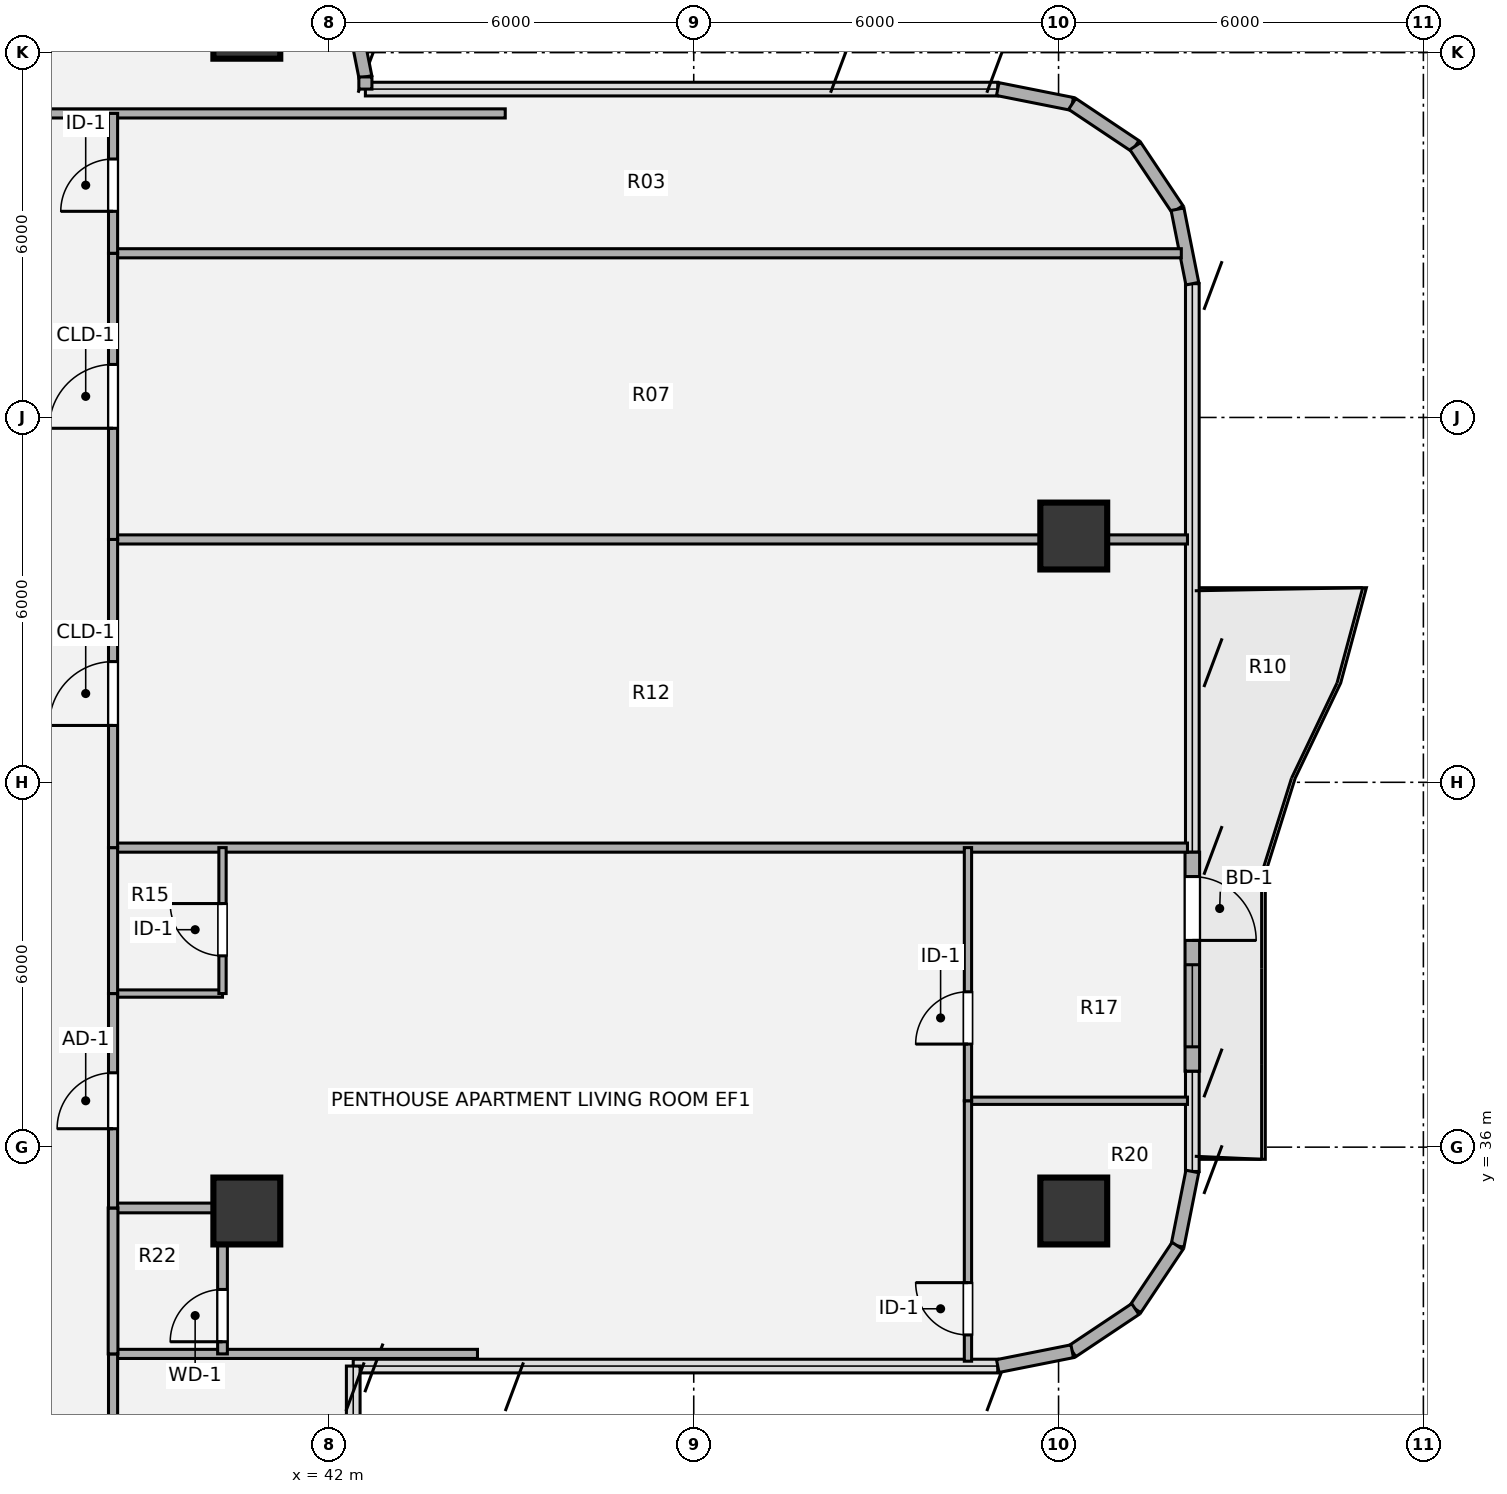
"""IFC4 building model, lengths in metres.
Left out: names, types, materials, properties, quantities, classifications, styles, units other than length and angle.
Written with IfcOpenShell. Run it as: python <this file> out.ifc"""

import sys

from ifc_helpers import new_model, si_unit, direction, frame, frame_2d, origin, origin_2d, place, context, subcontext, project, spatial, rectangle, hollow_circle, extrude, source, transform, mapped, element, fill, save


model = new_model("IFC4")
c1 = context("Model", 3, precision=1e-05, world=origin(), true_north=direction((0.0, 1.0)))
c2 = subcontext(c1, "Body", "Model", "MODEL_VIEW")
j1 = project(units=[si_unit("LENGTHUNIT", "METRE"), si_unit("PLANEANGLEUNIT", "RADIAN")], contexts=[c1])
p1 = place(None, origin())
s1 = spatial("IfcSite", under=j1, at=p1, CompositionType="ELEMENT")
p2 = place(p1, origin())
s2 = spatial("IfcBuilding", under=s1, at=p2, CompositionType="ELEMENT")
p3 = place(p2, frame((0.0, 0.0, 209.34)))
s3 = spatial("IfcBuildingStorey", under=s2, at=p3, CompositionType="ELEMENT", Elevation=209.34)
m1 = source(origin(), c2, "Body", "SweptSolid", [
    extrude(hollow_circle(Radius=0.55, WallThickness=0.04, at=origin_2d()), origin(), (0.0, 0.0, 1.0), 3.372),
])
for number, where, z_axis, x_axis in (
    (1, (54.25, 34.95, 0.0), (0.0, 0.0, 1.0), (1.0, 0.0, 0.0)),
    (2, (54.25, 46.05, 0.0), (0.0, 0.0, 1.0), (1.0, 0.0, 0.0)),
    (3, (40.65, 34.95, 0.0), (0.0, 0.0, 1.0), (1.0, 0.0, 0.0)),
    (4, (40.65, 54.45, 0.0), (0.0, 0.0, 1.0), (1.0, 0.0, 0.0)),
):
    element("IfcColumn", number, at=place(p3, frame(where, z_axis=z_axis, x_axis=x_axis)), inside=s3, PredefinedType="COLUMN", context=c2, shape_type="MappedRepresentation", body=[
        mapped(m1, transform((0.0, 0.0, 0.0), x_axis=(1.0, 0.0, 0.0), y_axis=(0.0, 1.0, 0.0), z_axis=(0.0, 0.0, 1.0), scale=1.0)),
    ])
p4 = place(p3, frame((42.387, 54.671, 0.0), z_axis=(0.0, 0.0, 1.0), x_axis=(0.195127417394, -0.980777900945, 0.0)))
e5 = element("IfcWall", 5, at=p4, inside=s3, PredefinedType="SOLIDWALL", context=c2, shape_type="SweptSolid", body=[
    extrude(rectangle(XDim=1.092, YDim=0.215, at=frame_2d((0.546, 0.0))), origin(), (0.0, 0.0, 1.0), 3.372),
])
p5 = place(p3, frame((42.6, 53.6, 0.0), z_axis=(0.0, 0.0, 1.0), x_axis=(0.0, -1.0, 0.0)))
e6 = element("IfcWall", 6, at=p5, inside=s3, PredefinedType="SOLIDWALL", context=c2, shape_type="SweptSolid", body=[
    extrude(rectangle(XDim=0.2, YDim=0.215, at=frame_2d((0.1, 0.0))), origin(), (0.0, 0.0, 1.0), 3.372),
])
for number, where, z_axis, x_axis in (
    (7, (53.0, 53.4, 0.0), (0.0, 0.0, 1.0), (0.981, -0.195, 0.0)),
    (8, (54.225, 53.156, 0.0), (0.0, 0.0, 1.0), (0.831, -0.556, 0.0)),
    (9, (55.263, 52.463, 0.0), (0.0, 0.0, 1.0), (0.556, -0.831, 0.0)),
    (10, (55.956, 51.425, 0.0), (0.0, 0.0, 1.0), (0.195, -0.981, 0.0)),
):
    element("IfcWall", number, at=place(p3, frame(where, z_axis=z_axis, x_axis=x_axis)), inside=s3, PredefinedType="SOLIDWALL", context=c2, shape_type="SweptSolid", body=[
        extrude(rectangle(XDim=1.249, YDim=0.215, at=frame_2d((0.624, 0.0))), origin(), (0.0, 0.0, 1.0), 3.372),
    ])
p6 = place(p3, frame((56.2, 40.85, 0.0), z_axis=(0.0, 0.0, 1.0), x_axis=(0.0, -1.0, 0.0)))
e11 = element("IfcWall", 11, at=p6, inside=s3, PredefinedType="SOLIDWALL", context=c2, shape_type="SweptSolid", body=[
    extrude(rectangle(XDim=3.6, YDim=0.24, at=frame_2d((1.8, 0.0))), origin(), (0.0, 0.0, 1.0), 3.372),
])
p7 = place(p6, frame((0.4, 0.0, 0.0)))
e12 = element("IfcOpeningElement", 12, at=p7, cuts=e11, PredefinedType="OPENING", context=c2, shape_type="SweptSolid", body=[
    extrude(rectangle(XDim=1.05, YDim=2.15, at=origin_2d()), frame((0.525, 0.13, 1.075), z_axis=(0.0, -1.0, 0.0), x_axis=(1.0, 0.0, 0.0)), (0.0, 0.0, 1.0), 0.26),
])
p8 = place(p6, frame((1.85, 0.0, 0.85)))
e13 = element("IfcOpeningElement", 13, at=p8, cuts=e11, PredefinedType="OPENING", context=c2, shape_type="SweptSolid", body=[
    extrude(rectangle(XDim=1.35, YDim=1.35, at=origin_2d()), frame((0.675, 0.13, 0.675), z_axis=(0.0, -1.0, 0.0), x_axis=(1.0, 0.0, 0.0)), (0.0, 0.0, 1.0), 0.26),
])
for number, where, z_axis, x_axis in (
    (14, (56.2, 35.6, 0.0), (0.0, 0.0, 1.0), (-0.195, -0.981, 0.0)),
    (15, (55.956, 34.375, 0.0), (0.0, 0.0, 1.0), (-0.556, -0.831, 0.0)),
    (16, (55.263, 33.337, 0.0), (0.0, 0.0, 1.0), (-0.831, -0.556, 0.0)),
    (17, (54.225, 32.644, 0.0), (0.0, 0.0, 1.0), (-0.981, -0.195, 0.0)),
):
    element("IfcWall", number, at=place(p3, frame(where, z_axis=z_axis, x_axis=x_axis)), inside=s3, PredefinedType="SOLIDWALL", context=c2, shape_type="SweptSolid", body=[
        extrude(rectangle(XDim=1.249, YDim=0.215, at=frame_2d((0.624, 0.0))), origin(), (0.0, 0.0, 1.0), 3.372),
    ])
p9 = place(p3, frame((38.45, 32.6, 0.0), z_axis=(0.0, 0.0, 1.0), x_axis=(1.0, 0.0, 0.0)))
e18 = element("IfcWall", 18, at=p9, inside=s3, PredefinedType="PARTITIONING", context=c2, shape_type="SweptSolid", body=[
    extrude(rectangle(XDim=5.993, YDim=0.15, at=frame_2d((2.997, 0.0))), origin(), (0.0, 0.0, 1.0), 3.342),
])
p10 = place(p3, frame((38.45, 35.0, 0.0), z_axis=(0.0, 0.0, 1.0), x_axis=(1.0, 0.0, 0.0)))
e19 = element("IfcWall", 19, at=p10, inside=s3, PredefinedType="PLUMBINGWALL", context=c2, shape_type="SweptSolid", body=[
    extrude(rectangle(XDim=1.8, YDim=0.16, at=frame_2d((0.9, 0.0))), origin(), (0.0, 0.0, 1.0), 1.857),
])
p11 = place(p3, frame((52.51, 36.763, 0.0), z_axis=(0.0, 0.0, 1.0), x_axis=(1.0, 0.0, 0.0)))
e20 = element("IfcWall", 20, at=p11, inside=s3, PredefinedType="PARTITIONING", context=c2, shape_type="SweptSolid", body=[
    extrude(rectangle(XDim=3.61, YDim=0.12, at=frame_2d((1.805, 0.0))), origin(), (0.0, 0.0, 1.0), 2.824),
])
p12 = place(p3, frame((38.45, 38.526, 0.0), z_axis=(0.0, 0.0, 1.0), x_axis=(1.0, 0.0, 0.0)))
e21 = element("IfcWall", 21, at=p12, inside=s3, PredefinedType="PARTITIONING", context=c2, shape_type="SweptSolid", body=[
    extrude(rectangle(XDim=1.8, YDim=0.12, at=frame_2d((0.9, 0.0))), origin(), (0.0, 0.0, 1.0), 3.101),
])
p13 = place(p3, frame((38.45, 40.926, 0.0), z_axis=(0.0, 0.0, 1.0), x_axis=(1.0, 0.0, 0.0)))
e22 = element("IfcWall", 22, at=p13, inside=s3, PredefinedType="PARTITIONING", context=c2, shape_type="SweptSolid", body=[
    extrude(rectangle(XDim=17.67, YDim=0.15, at=frame_2d((8.835, 0.0))), origin(), (0.0, 0.0, 1.0), 2.824),
])
p14 = place(p3, frame((38.45, 45.994, 0.0), z_axis=(0.0, 0.0, 1.0), x_axis=(1.0, 0.0, 0.0)))
e23 = element("IfcWall", 23, at=p14, inside=s3, PredefinedType="PARTITIONING", context=c2, shape_type="SweptSolid", body=[
    extrude(rectangle(XDim=17.67, YDim=0.15, at=frame_2d((8.835, 0.0))), origin(), (0.0, 0.0, 1.0), 2.457),
])
p15 = place(p3, frame((38.45, 50.7, 0.0), z_axis=(0.0, 0.0, 1.0), x_axis=(1.0, 0.0, 0.0)))
e24 = element("IfcWall", 24, at=p15, inside=s3, PredefinedType="PARTITIONING", context=c2, shape_type="SweptSolid", body=[
    extrude(rectangle(XDim=17.569, YDim=0.15, at=frame_2d((8.785, 0.0))), origin(), (0.0, 0.0, 1.0), 3.15),
])
p16 = place(p3, frame((27.1, 53.0, 0.0), z_axis=(0.0, 0.0, 1.0), x_axis=(1.0, 0.0, 0.0)))
e25 = element("IfcWall", 25, at=p16, inside=s3, PredefinedType="PARTITIONING", context=c2, shape_type="SweptSolid", body=[
    extrude(rectangle(XDim=17.8, YDim=0.15, at=frame_2d((8.9, 0.0))), origin(), (0.0, 0.0, 1.0), 3.15),
])
p17 = place(p16, frame((8.375, 0.0, 0.0)))
e26 = element("IfcOpeningElement", 26, at=p17, cuts=e25, PredefinedType="OPENING", context=c2, shape_type="SweptSolid", body=[
    extrude(rectangle(XDim=1.05, YDim=2.1, at=origin_2d()), frame((0.525, 0.085, 1.05), z_axis=(0.0, -1.0, 0.0), x_axis=(1.0, 0.0, 0.0)), (0.0, 0.0, 1.0), 0.17),
])
p18 = place(p3, frame((38.45, 21.2, 0.0), z_axis=(0.0, 0.0, 1.0), x_axis=(0.0, 1.0, 0.0)))
e27 = element("IfcWall", 27, at=p18, inside=s3, PredefinedType="PARTITIONING", context=c2, shape_type="SweptSolid", body=[
    extrude(rectangle(XDim=11.4, YDim=0.15, at=frame_2d((5.7, 0.0))), origin(), (0.0, 0.0, 1.0), 3.342),
])
p19 = place(p18, frame((5.075, 0.0, 0.0)))
e28 = element("IfcOpeningElement", 28, at=p19, cuts=e27, PredefinedType="OPENING", context=c2, shape_type="SweptSolid", body=[
    extrude(rectangle(XDim=1.05, YDim=2.1, at=origin_2d()), frame((0.525, 0.085, 1.05), z_axis=(0.0, -1.0, 0.0), x_axis=(1.0, 0.0, 0.0)), (0.0, 0.0, 1.0), 0.17),
])
p20 = place(p3, frame((38.45, 32.6, 0.0), z_axis=(0.0, 0.0, 1.0), x_axis=(0.0, 1.0, 0.0)))
e29 = element("IfcWall", 29, at=p20, inside=s3, PredefinedType="PLUMBINGWALL", context=c2, shape_type="SweptSolid", body=[
    extrude(rectangle(XDim=2.4, YDim=0.16, at=frame_2d((1.2, 0.0))), origin(), (0.0, 0.0, 1.0), 3.342),
])
p21 = place(p3, frame((38.45, 35.0, 0.0), z_axis=(0.0, 0.0, 1.0), x_axis=(0.0, 1.0, 0.0)))
e30 = element("IfcWall", 30, at=p21, inside=s3, PredefinedType="PARTITIONING", context=c2, shape_type="SweptSolid", body=[
    extrude(rectangle(XDim=3.526, YDim=0.15, at=frame_2d((1.763, 0.0))), origin(), (0.0, 0.0, 1.0), 3.342),
])
p22 = place(p21, frame((1.303, 0.0, 0.0)))
e31 = element("IfcOpeningElement", 31, at=p22, cuts=e30, PredefinedType="OPENING", context=c2, shape_type="SweptSolid", body=[
    extrude(rectangle(XDim=0.92, YDim=2.1, at=origin_2d()), frame((0.46, 0.085, 1.05), z_axis=(0.0, -1.0, 0.0), x_axis=(1.0, 0.0, 0.0)), (0.0, 0.0, 1.0), 0.17),
])
p23 = place(p3, frame((38.45, 38.526, 0.0), z_axis=(0.0, 0.0, 1.0), x_axis=(0.0, 1.0, 0.0)))
e32 = element("IfcWall", 32, at=p23, inside=s3, PredefinedType="PARTITIONING", context=c2, shape_type="SweptSolid", body=[
    extrude(rectangle(XDim=2.4, YDim=0.15, at=frame_2d((1.2, 0.0))), origin(), (0.0, 0.0, 1.0), 3.342),
])
p24 = place(p3, frame((38.45, 40.926, 0.0), z_axis=(0.0, 0.0, 1.0), x_axis=(0.0, 1.0, 0.0)))
e33 = element("IfcWall", 33, at=p24, inside=s3, PredefinedType="PARTITIONING", context=c2, shape_type="SweptSolid", body=[
    extrude(rectangle(XDim=5.068, YDim=0.15, at=frame_2d((2.534, 0.0))), origin(), (0.0, 0.0, 1.0), 3.342),
])
p25 = place(p24, frame((2.009, 0.0, 0.0)))
e34 = element("IfcOpeningElement", 34, at=p25, cuts=e33, PredefinedType="OPENING", context=c2, shape_type="SweptSolid", body=[
    extrude(rectangle(XDim=1.05, YDim=2.1, at=origin_2d()), frame((0.525, 0.085, 1.05), z_axis=(0.0, -1.0, 0.0), x_axis=(1.0, 0.0, 0.0)), (0.0, 0.0, 1.0), 0.17),
])
p26 = place(p3, frame((38.45, 45.994, 0.0), z_axis=(0.0, 0.0, 1.0), x_axis=(0.0, 1.0, 0.0)))
e35 = element("IfcWall", 35, at=p26, inside=s3, PredefinedType="PARTITIONING", context=c2, shape_type="SweptSolid", body=[
    extrude(rectangle(XDim=4.706, YDim=0.15, at=frame_2d((2.353, 0.0))), origin(), (0.0, 0.0, 1.0), 3.342),
])
p27 = place(p26, frame((1.828, 0.0, 0.0)))
e36 = element("IfcOpeningElement", 36, at=p27, cuts=e35, PredefinedType="OPENING", context=c2, shape_type="SweptSolid", body=[
    extrude(rectangle(XDim=1.05, YDim=2.1, at=origin_2d()), frame((0.525, 0.085, 1.05), z_axis=(0.0, -1.0, 0.0), x_axis=(1.0, 0.0, 0.0)), (0.0, 0.0, 1.0), 0.17),
])
p28 = place(p3, frame((38.45, 50.7, 0.0), z_axis=(0.0, 0.0, 1.0), x_axis=(0.0, 1.0, 0.0)))
e37 = element("IfcWall", 37, at=p28, inside=s3, PredefinedType="PARTITIONING", context=c2, shape_type="SweptSolid", body=[
    extrude(rectangle(XDim=2.3, YDim=0.15, at=frame_2d((1.15, 0.0))), origin(), (0.0, 0.0, 1.0), 3.342),
])
p29 = place(p28, frame((0.69, 0.0, 0.0)))
e38 = element("IfcOpeningElement", 38, at=p29, cuts=e37, PredefinedType="OPENING", context=c2, shape_type="SweptSolid", body=[
    extrude(rectangle(XDim=0.86, YDim=2.1, at=origin_2d()), frame((0.43, 0.085, 1.05), z_axis=(0.0, -1.0, 0.0), x_axis=(1.0, 0.0, 0.0)), (0.0, 0.0, 1.0), 0.17),
])
p30 = place(p3, frame((40.25, 32.6, 0.0), z_axis=(0.0, 0.0, 1.0), x_axis=(0.0, 1.0, 0.0)))
e39 = element("IfcWall", 39, at=p30, inside=s3, PredefinedType="PLUMBINGWALL", context=c2, shape_type="SweptSolid", body=[
    extrude(rectangle(XDim=2.4, YDim=0.16, at=frame_2d((1.2, 0.0))), origin(), (0.0, 0.0, 1.0), 3.342),
])
p31 = place(p30, frame((0.2, 0.0, 0.0)))
e40 = element("IfcOpeningElement", 40, at=p31, cuts=e39, PredefinedType="OPENING", context=c2, shape_type="SweptSolid", body=[
    extrude(rectangle(XDim=0.86, YDim=2.1, at=origin_2d()), frame((0.43, 0.09, 1.05), z_axis=(0.0, -1.0, 0.0), x_axis=(1.0, 0.0, 0.0)), (0.0, 0.0, 1.0), 0.18),
])
p32 = place(p3, frame((40.25, 38.526, 0.0), z_axis=(0.0, 0.0, 1.0), x_axis=(0.0, 1.0, 0.0)))
e41 = element("IfcWall", 41, at=p32, inside=s3, PredefinedType="PARTITIONING", context=c2, shape_type="SweptSolid", body=[
    extrude(rectangle(XDim=2.4, YDim=0.12, at=frame_2d((1.2, 0.0))), origin(), (0.0, 0.0, 1.0), 3.342),
])
p33 = place(p32, frame((0.62, 0.0, 0.0)))
e42 = element("IfcOpeningElement", 42, at=p33, cuts=e41, PredefinedType="OPENING", context=c2, shape_type="SweptSolid", body=[
    extrude(rectangle(XDim=0.86, YDim=2.1, at=origin_2d()), frame((0.43, 0.07, 1.05), z_axis=(0.0, -1.0, 0.0), x_axis=(1.0, 0.0, 0.0)), (0.0, 0.0, 1.0), 0.14),
])
p34 = place(p3, frame((52.51, 32.48, 0.0), z_axis=(0.0, 0.0, 1.0), x_axis=(0.0, 1.0, 0.0)))
e43 = element("IfcWall", 43, at=p34, inside=s3, PredefinedType="PARTITIONING", context=c2, shape_type="SweptSolid", body=[
    extrude(rectangle(XDim=4.283, YDim=0.12, at=frame_2d((2.142, 0.0))), origin(), (0.0, 0.0, 1.0), 3.342),
])
p35 = place(p34, frame((0.432, 0.0, 0.0)))
e44 = element("IfcOpeningElement", 44, at=p35, cuts=e43, PredefinedType="OPENING", context=c2, shape_type="SweptSolid", body=[
    extrude(rectangle(XDim=0.86, YDim=2.1, at=origin_2d()), frame((0.43, 0.07, 1.05), z_axis=(0.0, -1.0, 0.0), x_axis=(1.0, 0.0, 0.0)), (0.0, 0.0, 1.0), 0.14),
])
p36 = place(p3, frame((52.51, 36.763, 0.0), z_axis=(0.0, 0.0, 1.0), x_axis=(0.0, 1.0, 0.0)))
e45 = element("IfcWall", 45, at=p36, inside=s3, PredefinedType="PARTITIONING", context=c2, shape_type="SweptSolid", body=[
    extrude(rectangle(XDim=4.163, YDim=0.12, at=frame_2d((2.082, 0.0))), origin(), (0.0, 0.0, 1.0), 3.342),
])
p37 = place(p36, frame((0.932, 0.0, 0.0)))
e46 = element("IfcOpeningElement", 46, at=p37, cuts=e45, PredefinedType="OPENING", context=c2, shape_type="SweptSolid", body=[
    extrude(rectangle(XDim=0.86, YDim=2.1, at=origin_2d()), frame((0.43, 0.07, 1.05), z_axis=(0.0, -1.0, 0.0), x_axis=(1.0, 0.0, 0.0)), (0.0, 0.0, 1.0), 0.14),
])
m2 = source(origin(), c2, "Body", "SweptSolid", [
    extrude(rectangle(XDim=1.05, YDim=2.15, at=origin_2d()), frame((0.525, 0.025, 1.075), z_axis=(0.0, -1.0, 0.0), x_axis=(1.0, 0.0, 0.0)), (0.0, 0.0, 1.0), 0.05),
])
p38 = place(p7, origin())
e47 = element("IfcDoor", 47, at=p38, inside=s3, OperationType="SINGLE_SWING_RIGHT", PredefinedType="DOOR", context=c2, shape_type="MappedRepresentation", body=[
    mapped(m2, transform((0.0, 0.0, 0.0), x_axis=(1.0, 0.0, 0.0), y_axis=(0.0, 1.0, 0.0), z_axis=(0.0, 0.0, 1.0), scale=1.0)),
])
fill(e12, e47)
m3 = source(origin(), c2, "Body", "SweptSolid", [
    extrude(rectangle(XDim=1.35, YDim=1.35, at=origin_2d()), frame((0.675, 0.03, 0.675), z_axis=(0.0, -1.0, 0.0), x_axis=(1.0, 0.0, 0.0)), (0.0, 0.0, 1.0), 0.06),
])
p39 = place(p8, origin())
e48 = element("IfcWindow", 48, at=p39, inside=s3, PartitioningType="SINGLE_PANEL", PredefinedType="WINDOW", context=c2, shape_type="MappedRepresentation", body=[
    mapped(m3, transform((0.0, 0.0, 0.0), x_axis=(1.0, 0.0, 0.0), y_axis=(0.0, 1.0, 0.0), z_axis=(0.0, 0.0, 1.0), scale=1.0)),
])
fill(e13, e48)
m4 = source(origin(), c2, "Body", "SweptSolid", [
    extrude(rectangle(XDim=0.92, YDim=2.1, at=origin_2d()), frame((0.46, 0.025, 1.05), z_axis=(0.0, -1.0, 0.0), x_axis=(1.0, 0.0, 0.0)), (0.0, 0.0, 1.0), 0.05),
])
p40 = place(p22, origin())
e49 = element("IfcDoor", 49, at=p40, inside=s3, OperationType="SINGLE_SWING_LEFT", PredefinedType="DOOR", context=c2, shape_type="MappedRepresentation", body=[
    mapped(m4, transform((0.0, 0.0, 0.0), x_axis=(1.0, 0.0, 0.0), y_axis=(0.0, 1.0, 0.0), z_axis=(0.0, 0.0, 1.0), scale=1.0)),
])
fill(e31, e49)
m5 = source(origin(), c2, "Body", "SweptSolid", [
    extrude(rectangle(XDim=1.05, YDim=2.1, at=origin_2d()), frame((0.525, 0.025, 1.05), z_axis=(0.0, -1.0, 0.0), x_axis=(1.0, 0.0, 0.0)), (0.0, 0.0, 1.0), 0.05),
])
p41 = place(p25, origin())
e50 = element("IfcDoor", 50, at=p41, inside=s3, OperationType="SINGLE_SWING_LEFT", PredefinedType="DOOR", context=c2, shape_type="MappedRepresentation", body=[
    mapped(m5, transform((0.0, 0.0, 0.0), x_axis=(1.0, 0.0, 0.0), y_axis=(0.0, 1.0, 0.0), z_axis=(0.0, 0.0, 1.0), scale=1.0)),
])
fill(e34, e50)
p42 = place(p27, origin())
e51 = element("IfcDoor", 51, at=p42, inside=s3, OperationType="SINGLE_SWING_LEFT", PredefinedType="DOOR", context=c2, shape_type="MappedRepresentation", body=[
    mapped(m5, transform((0.0, 0.0, 0.0), x_axis=(1.0, 0.0, 0.0), y_axis=(0.0, 1.0, 0.0), z_axis=(0.0, 0.0, 1.0), scale=1.0)),
])
fill(e36, e51)
m6 = source(origin(), c2, "Body", "SweptSolid", [
    extrude(rectangle(XDim=0.86, YDim=2.1, at=origin_2d()), frame((0.43, 0.025, 1.05), z_axis=(0.0, -1.0, 0.0), x_axis=(1.0, 0.0, 0.0)), (0.0, 0.0, 1.0), 0.05),
])
p43 = place(p29, origin())
e52 = element("IfcDoor", 52, at=p43, inside=s3, OperationType="SINGLE_SWING_LEFT", PredefinedType="DOOR", context=c2, shape_type="MappedRepresentation", body=[
    mapped(m6, transform((0.0, 0.0, 0.0), x_axis=(1.0, 0.0, 0.0), y_axis=(0.0, 1.0, 0.0), z_axis=(0.0, 0.0, 1.0), scale=1.0)),
])
fill(e38, e52)
m7 = source(origin(), c2, "Body", "SweptSolid", [
    extrude(rectangle(XDim=0.86, YDim=2.1, at=origin_2d()), frame((0.43, 0.025, 1.05), z_axis=(0.0, -1.0, 0.0), x_axis=(1.0, 0.0, 0.0)), (0.0, 0.0, 1.0), 0.05),
])
p44 = place(p31, origin())
e53 = element("IfcDoor", 53, at=p44, inside=s3, OperationType="SINGLE_SWING_LEFT", PredefinedType="DOOR", context=c2, shape_type="MappedRepresentation", body=[
    mapped(m7, transform((0.0, 0.0, 0.0), x_axis=(1.0, 0.0, 0.0), y_axis=(0.0, 1.0, 0.0), z_axis=(0.0, 0.0, 1.0), scale=1.0)),
])
fill(e40, e53)
p45 = place(p33, origin())
e54 = element("IfcDoor", 54, at=p45, inside=s3, OperationType="SINGLE_SWING_RIGHT", PredefinedType="DOOR", context=c2, shape_type="MappedRepresentation", body=[
    mapped(m6, transform((0.0, 0.0, 0.0), x_axis=(1.0, 0.0, 0.0), y_axis=(0.0, 1.0, 0.0), z_axis=(0.0, 0.0, 1.0), scale=1.0)),
])
fill(e42, e54)
p46 = place(p35, origin())
e55 = element("IfcDoor", 55, at=p46, inside=s3, OperationType="SINGLE_SWING_RIGHT", PredefinedType="DOOR", context=c2, shape_type="MappedRepresentation", body=[
    mapped(m6, transform((0.0, 0.0, 0.0), x_axis=(1.0, 0.0, 0.0), y_axis=(0.0, 1.0, 0.0), z_axis=(0.0, 0.0, 1.0), scale=1.0)),
])
fill(e44, e55)
p47 = place(p37, origin())
e56 = element("IfcDoor", 56, at=p47, inside=s3, OperationType="SINGLE_SWING_LEFT", PredefinedType="DOOR", context=c2, shape_type="MappedRepresentation", body=[
    mapped(m6, transform((0.0, 0.0, 0.0), x_axis=(1.0, 0.0, 0.0), y_axis=(0.0, 1.0, 0.0), z_axis=(0.0, 0.0, 1.0), scale=1.0)),
])
fill(e46, e56)
save(model, sys.argv[1])
